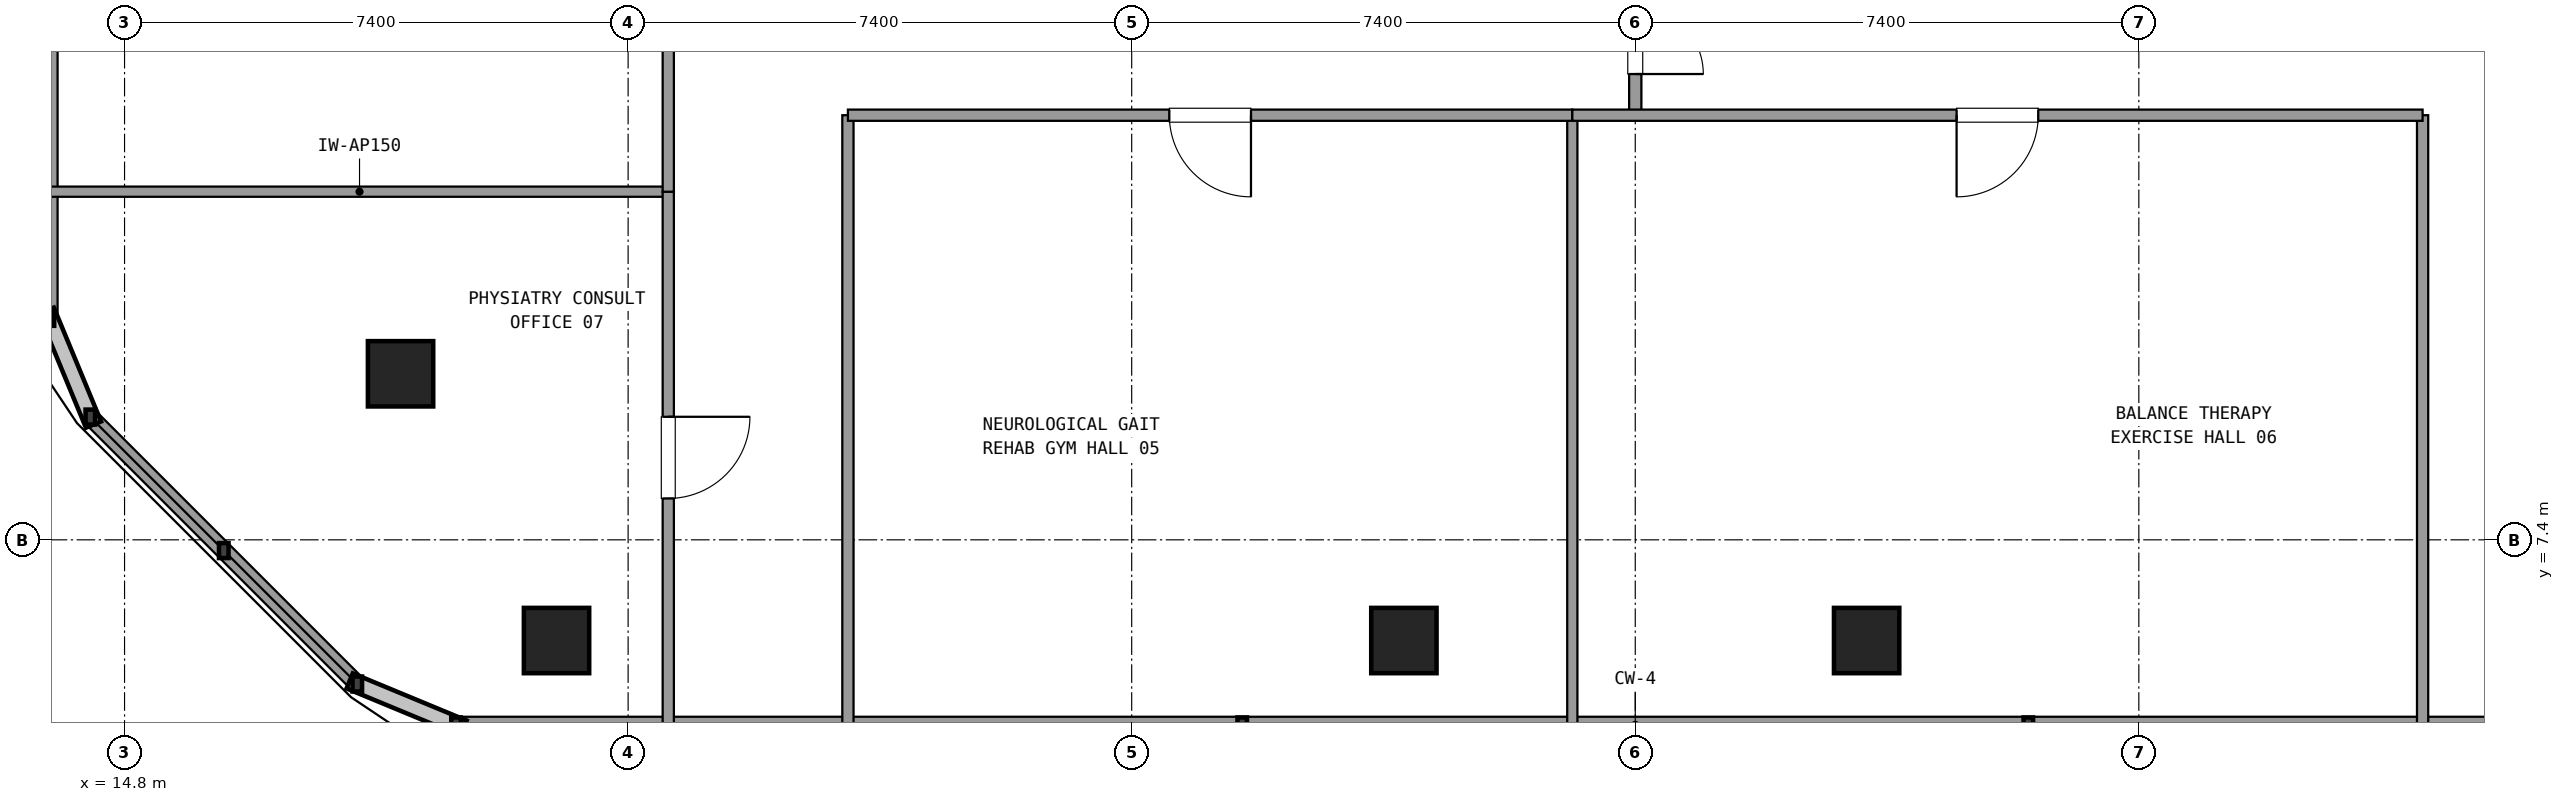
"""IFC4 building model, lengths in metres.
Left out: names, types, materials, properties, quantities, classifications, styles, units other than length and angle.
Written with IfcOpenShell. Run it as: python <this file> out.ifc"""

import sys

from ifc_helpers import new_model, si_unit, direction, frame, frame_2d, origin, origin_2d, place, context, subcontext, project, spatial, rectangle, extrude, element, fill, save


model = new_model("IFC4")
c1 = context("Model", 3, precision=1e-05, world=origin(), true_north=direction((0.0, 1.0)))
c2 = subcontext(c1, "Body", "Model", "MODEL_VIEW")
j1 = project(units=[si_unit("LENGTHUNIT", "METRE"), si_unit("PLANEANGLEUNIT", "RADIAN")], contexts=[c1])
p1 = place(None, origin())
s1 = spatial("IfcSite", under=j1, at=p1, CompositionType="ELEMENT")
p2 = place(p1, origin())
s2 = spatial("IfcBuilding", under=s1, at=p2, CompositionType="ELEMENT")
p3 = place(p2, frame((0.0, 0.0, 170.82)))
s3 = spatial("IfcBuildingStorey", under=s2, at=p3, CompositionType="ELEMENT", Elevation=170.82)
for number, where, z_axis, x_axis in (
    (1, (18.856, 9.84, 0.0), (0.0, 0.0, 1.0), (1.0, 0.0, 0.0)),
    (2, (21.148, 5.92, 0.0), (0.0, 0.0, 1.0), (1.0, 0.0, 0.0)),
    (3, (33.6, 5.92, 0.0), (0.0, 0.0, 1.0), (1.0, 0.0, 0.0)),
    (4, (40.4, 5.92, 0.0), (0.0, 0.0, 1.0), (1.0, 0.0, 0.0)),
):
    element("IfcColumn", number, at=place(p3, frame(where, z_axis=z_axis, x_axis=x_axis)), inside=s3, PredefinedType="COLUMN", context=c2, shape_type="SweptSolid", body=[
        extrude(rectangle(XDim=0.96, YDim=0.96, at=origin_2d()), origin(), (0.0, 0.0, 1.0), 3.6),
    ])
p4 = place(p3, frame((19.671, 4.68, 0.0), z_axis=(0.0, 0.0, 1.0), x_axis=(1.0, 0.0, 0.0)))
e5 = element("IfcWall", 5, at=p4, inside=s3, PredefinedType="SOLIDWALL", context=c2, shape_type="SweptSolid", body=[
    extrude(rectangle(XDim=34.658, YDim=0.24, at=frame_2d((17.329, 0.0))), origin(), (0.0, 0.0, 1.0), 0.85),
])
p5 = place(p3, frame((13.696, 24.36, 0.0), z_axis=(0.0, 0.0, 1.0), x_axis=(0.0, -1.0, 0.0)))
e6 = element("IfcWall", 6, at=p5, inside=s3, PredefinedType="SOLIDWALL", context=c2, shape_type="SweptSolid", body=[
    extrude(rectangle(XDim=13.705, YDim=0.24, at=frame_2d((6.853, 0.0))), origin(), (0.0, 0.0, 1.0), 0.85),
])
p6 = place(p3, frame((14.297, 9.204, 0.0), z_axis=(0.0, 0.0, 1.0), x_axis=(0.707084777957, -0.707128783731, 0.0)))
e7 = element("IfcWall", 7, at=p6, inside=s3, PredefinedType="SOLIDWALL", context=c2, shape_type="SweptSolid", body=[
    extrude(rectangle(XDim=5.548, YDim=0.24, at=frame_2d((2.774, 0.0))), origin(), (0.0, 0.0, 1.0), 0.85),
])
p7 = place(p3, frame((37.0, 13.64, 0.0), z_axis=(0.0, 0.0, 1.0), x_axis=(0.0, 1.0, 0.0)))
e8 = element("IfcWall", 8, at=p7, inside=s3, PredefinedType="PARTITIONING", context=c2, shape_type="SweptSolid", body=[
    extrude(rectangle(XDim=3.21, YDim=0.18, at=frame_2d((1.605, 0.0))), origin(), (0.0, 0.0, 1.0), 2.61),
])
p8 = place(p7, frame((0.605, 0.0, 0.0)))
e9 = element("IfcOpeningElement", 9, at=p8, cuts=e8, PredefinedType="OPENING", context=c2, shape_type="SweptSolid", body=[
    extrude(rectangle(XDim=2.0, YDim=2.2, at=frame_2d((1.0, 1.1))), frame((0.0, 0.1, 0.0), z_axis=(0.0, -1.0, 0.0), x_axis=(1.0, 0.0, 0.0)), (0.0, 0.0, 1.0), 0.2),
])
for number, where, z_axis, x_axis in (
    (10, (25.43, 4.7, 0.0), (0.0, 0.0, 1.0), (0.0, 1.0, 0.0)),
    (11, (48.57, 4.7, 0.0), (0.0, 0.0, 1.0), (0.0, 1.0, 0.0)),
):
    element("IfcWall", number, at=place(p3, frame(where, z_axis=z_axis, x_axis=x_axis)), inside=s3, PredefinedType="PARTITIONING", context=c2, shape_type="SweptSolid", body=[
        extrude(rectangle(XDim=8.94, YDim=0.165, at=frame_2d((4.47, 0.0))), origin(), (0.0, 0.0, 1.0), 2.61),
    ])
p9 = place(p3, frame((36.075, 13.64, 0.0), z_axis=(0.0, 0.0, 1.0), x_axis=(0.0, -1.0, 0.0)))
e12 = element("IfcWall", 12, at=p9, inside=s3, PredefinedType="PARTITIONING", context=c2, shape_type="SweptSolid", body=[
    extrude(rectangle(XDim=8.94, YDim=0.15, at=frame_2d((4.47, 0.0))), origin(), (0.0, 0.0, 1.0), 2.61),
])
p10 = place(p3, frame((25.43, 13.64, 0.0), z_axis=(0.0, 0.0, 1.0), x_axis=(1.0, 0.0, 0.0)))
e13 = element("IfcWall", 13, at=p10, inside=s3, PredefinedType="PARTITIONING", context=c2, shape_type="SweptSolid", body=[
    extrude(rectangle(XDim=10.645, YDim=0.165, at=frame_2d((5.323, 0.0))), origin(), (0.0, 0.0, 1.0), 2.61),
])
p11 = place(p10, frame((4.723, 0.0, 0.0)))
e14 = element("IfcOpeningElement", 14, at=p11, cuts=e13, PredefinedType="OPENING", context=c2, shape_type="SweptSolid", body=[
    extrude(rectangle(XDim=1.2, YDim=2.15, at=frame_2d((0.6, 1.075))), frame((0.0, 0.093, 0.0), z_axis=(0.0, -1.0, 0.0), x_axis=(1.0, 0.0, 0.0)), (0.0, 0.0, 1.0), 0.185),
])
p12 = place(p3, frame((36.075, 13.64, 0.0), z_axis=(0.0, 0.0, 1.0), x_axis=(1.0, 0.0, 0.0)))
e15 = element("IfcWall", 15, at=p12, inside=s3, PredefinedType="PARTITIONING", context=c2, shape_type="SweptSolid", body=[
    extrude(rectangle(XDim=12.495, YDim=0.165, at=frame_2d((6.248, 0.0))), origin(), (0.0, 0.0, 1.0), 2.61),
])
p13 = place(p12, frame((5.647, 0.0, 0.0)))
e16 = element("IfcOpeningElement", 16, at=p13, cuts=e15, PredefinedType="OPENING", context=c2, shape_type="SweptSolid", body=[
    extrude(rectangle(XDim=1.2, YDim=2.15, at=frame_2d((0.6, 1.075))), frame((0.0, 0.093, 0.0), z_axis=(0.0, -1.0, 0.0), x_axis=(1.0, 0.0, 0.0)), (0.0, 0.0, 1.0), 0.185),
])
p14 = place(p3, frame((22.79, 12.516, 0.0), z_axis=(0.0, 0.0, 1.0), x_axis=(-1.0, 0.0, 0.0)))
e17 = element("IfcWall", 17, at=p14, inside=s3, PredefinedType="PARTITIONING", context=c2, shape_type="SweptSolid", body=[
    extrude(rectangle(XDim=9.074, YDim=0.15, at=frame_2d((4.537, 0.0))), origin(), (0.0, 0.0, 1.0), 2.61),
])
p15 = place(p3, frame((22.79, 4.7, 0.0), z_axis=(0.0, 0.0, 1.0), x_axis=(0.0, 1.0, 0.0)))
e18 = element("IfcWall", 18, at=p15, inside=s3, PredefinedType="PARTITIONING", context=c2, shape_type="SweptSolid", body=[
    extrude(rectangle(XDim=7.816, YDim=0.165, at=frame_2d((3.908, 0.0))), origin(), (0.0, 0.0, 1.0), 2.61),
])
p16 = place(p15, frame((3.308, 0.0, 0.0)))
e19 = element("IfcOpeningElement", 19, at=p16, cuts=e18, PredefinedType="OPENING", context=c2, shape_type="SweptSolid", body=[
    extrude(rectangle(XDim=1.2, YDim=2.15, at=frame_2d((0.6, 1.075))), frame((0.0, 0.093, 0.0), z_axis=(0.0, -1.0, 0.0), x_axis=(1.0, 0.0, 0.0)), (0.0, 0.0, 1.0), 0.185),
])
p17 = place(p3, frame((22.79, 12.516, 0.0), z_axis=(0.0, 0.0, 1.0), x_axis=(0.0, 1.0, 0.0)))
e20 = element("IfcWall", 20, at=p17, inside=s3, PredefinedType="PARTITIONING", context=c2, shape_type="SweptSolid", body=[
    extrude(rectangle(XDim=11.724, YDim=0.165, at=frame_2d((5.862, 0.0))), origin(), (0.0, 0.0, 1.0), 2.61),
])
p18 = place(p17, frame((5.262, 0.0, 0.0)))
e21 = element("IfcOpeningElement", 21, at=p18, cuts=e20, PredefinedType="OPENING", context=c2, shape_type="SweptSolid", body=[
    extrude(rectangle(XDim=1.2, YDim=2.15, at=frame_2d((0.6, 1.075))), frame((0.0, 0.093, 0.0), z_axis=(0.0, -1.0, 0.0), x_axis=(1.0, 0.0, 0.0)), (0.0, 0.0, 1.0), 0.185),
])
p19 = place(p8, frame((2.0, 0.0, 0.0), z_axis=(0.0, 0.0, 1.0), x_axis=(-1.0, 0.0, 0.0)))
e22 = element("IfcDoor", 22, at=p19, inside=s3, OperationType="DOUBLE_DOOR_SINGLE_SWING", PredefinedType="DOOR", context=c2, shape_type="SweptSolid", body=[
    extrude(rectangle(XDim=2.0, YDim=2.2, at=frame_2d((1.0, 1.1))), frame((0.0, 0.025, 0.0), z_axis=(0.0, -1.0, 0.0), x_axis=(1.0, 0.0, 0.0)), (0.0, 0.0, 1.0), 0.05),
])
fill(e9, e22)
p20 = place(p11, frame((1.2, 0.0, 0.0), z_axis=(0.0, 0.0, 1.0), x_axis=(-1.0, 0.0, 0.0)))
e23 = element("IfcDoor", 23, at=p20, inside=s3, OperationType="SINGLE_SWING_RIGHT", PredefinedType="DOOR", context=c2, shape_type="SweptSolid", body=[
    extrude(rectangle(XDim=1.2, YDim=2.15, at=frame_2d((0.6, 1.075))), frame((0.0, 0.025, 0.0), z_axis=(0.0, -1.0, 0.0), x_axis=(1.0, 0.0, 0.0)), (0.0, 0.0, 1.0), 0.05),
])
fill(e14, e23)
p21 = place(p13, frame((1.2, 0.0, 0.0), z_axis=(0.0, 0.0, 1.0), x_axis=(-1.0, 0.0, 0.0)))
e24 = element("IfcDoor", 24, at=p21, inside=s3, OperationType="SINGLE_SWING_LEFT", PredefinedType="DOOR", context=c2, shape_type="SweptSolid", body=[
    extrude(rectangle(XDim=1.2, YDim=2.15, at=frame_2d((0.6, 1.075))), frame((0.0, 0.025, 0.0), z_axis=(0.0, -1.0, 0.0), x_axis=(1.0, 0.0, 0.0)), (0.0, 0.0, 1.0), 0.05),
])
fill(e16, e24)
p22 = place(p16, frame((1.2, 0.0, 0.0), z_axis=(0.0, 0.0, 1.0), x_axis=(-1.0, 0.0, 0.0)))
e25 = element("IfcDoor", 25, at=p22, inside=s3, OperationType="SINGLE_SWING_RIGHT", PredefinedType="DOOR", context=c2, shape_type="SweptSolid", body=[
    extrude(rectangle(XDim=1.2, YDim=2.15, at=frame_2d((0.6, 1.075))), frame((0.0, 0.025, 0.0), z_axis=(0.0, -1.0, 0.0), x_axis=(1.0, 0.0, 0.0)), (0.0, 0.0, 1.0), 0.05),
])
fill(e19, e25)
save(model, sys.argv[1])
